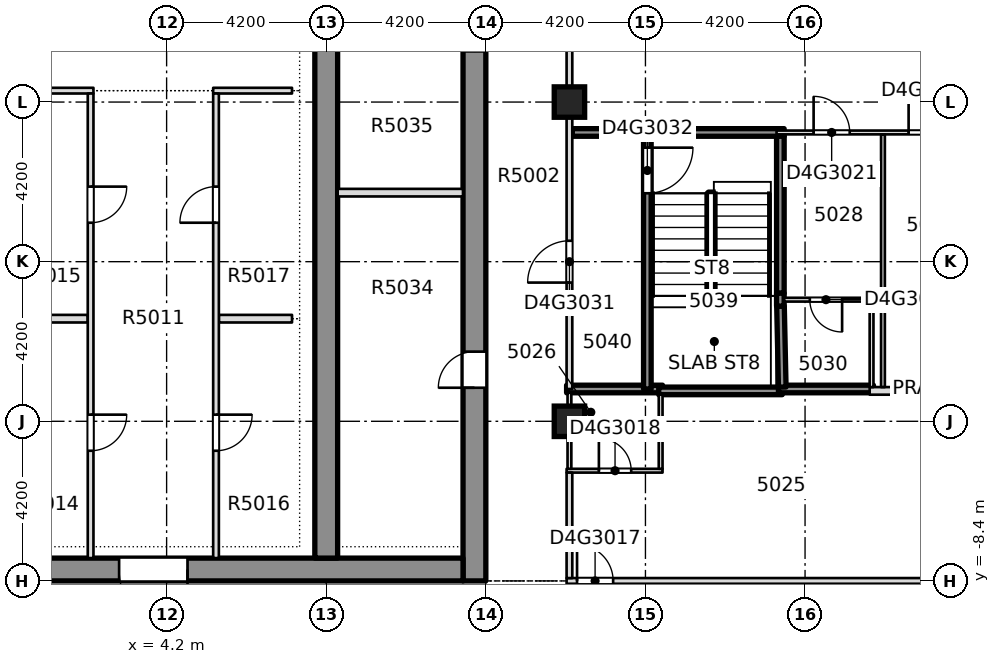
"""IFC4 building model, lengths in metres.
Left out: names, types, materials, properties, quantities, classifications, styles, units other than length and angle.
Written with IfcOpenShell. Run it as: python <this file> out.ifc"""

import sys

from ifc_helpers import new_model, si_unit, direction, frame, frame_2d, origin, origin_2d, place, context, subcontext, project, spatial, rectangle, extrude, element, fill, save


model = new_model("IFC4")
c1 = context("Model", 3, precision=1e-05, world=origin(), true_north=direction((0.0, 1.0)))
c2 = subcontext(c1, "Body", "Model", "MODEL_VIEW")
j1 = project(units=[si_unit("LENGTHUNIT", "METRE"), si_unit("PLANEANGLEUNIT", "RADIAN")], contexts=[c1])
p1 = place(None, origin())
s1 = spatial("IfcSite", under=j1, at=p1, CompositionType="ELEMENT")
p2 = place(p1, origin())
s2 = spatial("IfcBuilding", under=s1, at=p2, CompositionType="ELEMENT")
p3 = place(p2, frame((0.0, 0.0, 192.8)))
s3 = spatial("IfcBuildingStorey", under=s2, at=p3, CompositionType="ELEMENT", Elevation=192.8)
p4 = place(p3, frame((12.3, -8.4, -0.4), z_axis=(0.0, 0.0, 1.0), x_axis=(0.0, 1.0, 0.0)))
e1 = element("IfcWall", 1, at=p4, inside=s3, PredefinedType="SHEAR", context=c2, shape_type="SweptSolid", body=[
    extrude(rectangle(XDim=30.15, YDim=0.6, at=frame_2d((15.075, 0.0))), origin(), (0.0, 0.0, 1.0), 3.45),
])
p5 = place(p4, frame((5.083, 0.0, 0.4)))
e2 = element("IfcOpeningElement", 2, at=p5, cuts=e1, PredefinedType="OPENING", context=c2, shape_type="SweptSolid", body=[
    extrude(rectangle(XDim=0.95, YDim=2.1, at=frame_2d((0.475, 1.05))), frame((0.0, 0.31, 0.0), z_axis=(0.0, -1.0, 0.0), x_axis=(1.0, 0.0, 0.0)), (0.0, 0.0, 1.0), 0.62),
])
p6 = place(p4, frame((13.933, 0.0, 0.4)))
e3 = element("IfcOpeningElement", 3, at=p6, cuts=e1, PredefinedType="OPENING", context=c2, shape_type="SweptSolid", body=[
    extrude(rectangle(XDim=0.95, YDim=2.1, at=frame_2d((0.475, 1.05))), frame((0.0, 0.31, 0.0), z_axis=(0.0, -1.0, 0.0), x_axis=(1.0, 0.0, 0.0)), (0.0, 0.0, 1.0), 0.62),
])
p7 = place(p4, frame((22.719, 0.0, 0.4)))
e4 = element("IfcOpeningElement", 4, at=p7, cuts=e1, PredefinedType="OPENING", context=c2, shape_type="SweptSolid", body=[
    extrude(rectangle(XDim=0.95, YDim=2.1, at=frame_2d((0.475, 1.05))), frame((0.0, 0.31, 0.0), z_axis=(0.0, -1.0, 0.0), x_axis=(1.0, 0.0, 0.0)), (0.0, 0.0, 1.0), 0.62),
])
p8 = place(p4, frame((25.506, 0.0, 0.4)))
e5 = element("IfcOpeningElement", 5, at=p8, cuts=e1, PredefinedType="OPENING", context=c2, shape_type="SweptSolid", body=[
    extrude(rectangle(XDim=0.95, YDim=2.1, at=frame_2d((0.475, 1.05))), frame((0.0, 0.31, 0.0), z_axis=(0.0, -1.0, 0.0), x_axis=(1.0, 0.0, 0.0)), (0.0, 0.0, 1.0), 0.62),
])
p9 = place(p4, frame((27.537, 0.0, 0.4)))
e6 = element("IfcOpeningElement", 6, at=p9, cuts=e1, PredefinedType="OPENING", context=c2, shape_type="SweptSolid", body=[
    extrude(rectangle(XDim=0.95, YDim=2.1, at=frame_2d((0.475, 1.05))), frame((0.0, 0.31, 0.0), z_axis=(0.0, -1.0, 0.0), x_axis=(1.0, 0.0, 0.0)), (0.0, 0.0, 1.0), 0.62),
])
p10 = place(p4, frame((19.3, 0.0, 0.4)))
e7 = element("IfcOpeningElement", 7, at=p10, cuts=e1, PredefinedType="OPENING", context=c2, shape_type="SweptSolid", body=[
    extrude(rectangle(XDim=1.2, YDim=2.1, at=frame_2d((0.6, 1.05))), frame((0.0, 0.31, 0.0), z_axis=(0.0, -1.0, 0.0), x_axis=(1.0, 0.0, 0.0)), (0.0, 0.0, 1.0), 0.62),
])
p11 = place(p3, frame((-12.0, -8.1, -0.4), z_axis=(0.0, 0.0, 1.0), x_axis=(1.0, 0.0, 0.0)))
e8 = element("IfcWall", 8, at=p11, inside=s3, PredefinedType="SHEAR", context=c2, shape_type="SweptSolid", body=[
    extrude(rectangle(XDim=24.0, YDim=0.6, at=frame_2d((12.0, 0.0))), origin(), (0.0, 0.0, 1.0), 3.45),
])
p12 = place(p11, frame((7.25, 0.0, 0.4)))
e9 = element("IfcOpeningElement", 9, at=p12, cuts=e8, PredefinedType="OPENING", context=c2, shape_type="SweptSolid", body=[
    extrude(rectangle(XDim=1.8, YDim=2.1, at=frame_2d((0.9, 1.05))), frame((0.0, 0.31, 0.0), z_axis=(0.0, -1.0, 0.0), x_axis=(1.0, 0.0, 0.0)), (0.0, 0.0, 1.0), 0.62),
])
p13 = place(p11, frame((14.95, 0.0, 0.4)))
e10 = element("IfcOpeningElement", 10, at=p13, cuts=e8, PredefinedType="OPENING", context=c2, shape_type="SweptSolid", body=[
    extrude(rectangle(XDim=1.8, YDim=2.1, at=frame_2d((0.9, 1.05))), frame((0.0, 0.31, 0.0), z_axis=(0.0, -1.0, 0.0), x_axis=(1.0, 0.0, 0.0)), (0.0, 0.0, 1.0), 0.62),
])
p14 = place(p3, frame((8.4, -7.8, -0.4), z_axis=(0.0, 0.0, 1.0), x_axis=(0.0, 1.0, 0.0)))
e11 = element("IfcWall", 11, at=p14, inside=s3, PredefinedType="SHEAR", context=c2, shape_type="SweptSolid", body=[
    extrude(rectangle(XDim=28.95, YDim=0.6, at=frame_2d((14.475, 0.0))), origin(), (0.0, 0.0, 1.0), 3.45),
])
p15 = place(p14, frame((18.7, 0.0, 0.4)))
e12 = element("IfcOpeningElement", 12, at=p15, cuts=e11, PredefinedType="OPENING", context=c2, shape_type="SweptSolid", body=[
    extrude(rectangle(XDim=1.2, YDim=2.1, at=frame_2d((0.6, 1.05))), frame((0.0, 0.31, 0.0), z_axis=(0.0, -1.0, 0.0), x_axis=(1.0, 0.0, 0.0)), (0.0, 0.0, 1.0), 0.62),
])
for number, where, z_axis, x_axis in (
    (13, (14.8, -4.2, -0.4), (0.0, 0.0, 1.0), (1.0, 0.0, 0.0)),
    (14, (14.8, 4.2, -0.4), (0.0, 0.0, 1.0), (1.0, 0.0, 0.0)),
):
    element("IfcColumn", number, at=place(p3, frame(where, z_axis=z_axis, x_axis=x_axis)), inside=s3, PredefinedType="COLUMN", context=c2, shape_type="SweptSolid", body=[
        extrude(rectangle(XDim=0.8, YDim=0.8, at=origin_2d()), origin(), (0.0, 0.0, 1.0), 3.45),
    ])
p16 = place(p3, frame((14.725, -8.4, 0.0), z_axis=(0.0, 0.0, 1.0), x_axis=(1.0, 0.0, 0.0)))
e15 = element("IfcWall", 15, at=p16, inside=s3, PredefinedType="PARTITIONING", context=c2, shape_type="SweptSolid", body=[
    extrude(rectangle(XDim=11.025, YDim=0.15, at=frame_2d((5.512, 0.0))), origin(), (0.0, 0.0, 1.0), 3.05),
])
p17 = place(p16, frame((0.275, 0.0, 0.0)))
e16 = element("IfcOpeningElement", 16, at=p17, cuts=e15, PredefinedType="OPENING", context=c2, shape_type="SweptSolid", body=[
    extrude(rectangle(XDim=0.95, YDim=2.1, at=frame_2d((0.475, 1.05))), frame((0.0, 0.085, 0.0), z_axis=(0.0, -1.0, 0.0), x_axis=(1.0, 0.0, 0.0)), (0.0, 0.0, 1.0), 0.17),
])
p18 = place(p3, frame((14.725, -5.5, 0.0), z_axis=(0.0, 0.0, 1.0), x_axis=(1.0, 0.0, 0.0)))
e17 = element("IfcWall", 17, at=p18, inside=s3, PredefinedType="PARTITIONING", context=c2, shape_type="SweptSolid", body=[
    extrude(rectangle(XDim=2.525, YDim=0.1, at=frame_2d((1.262, 0.0))), origin(), (0.0, 0.0, 1.0), 3.05),
])
p19 = place(p18, frame((0.85, 0.0, 0.0)))
e18 = element("IfcOpeningElement", 18, at=p19, cuts=e17, PredefinedType="OPENING", context=c2, shape_type="SweptSolid", body=[
    extrude(rectangle(XDim=0.85, YDim=2.1, at=frame_2d((0.425, 1.05))), frame((0.0, 0.06, 0.0), z_axis=(0.0, -1.0, 0.0), x_axis=(1.0, 0.0, 0.0)), (0.0, 0.0, 1.0), 0.12),
])
p20 = place(p3, frame((14.725, -3.35, 0.0), z_axis=(0.0, 0.0, 1.0), x_axis=(1.0, 0.0, 0.0)))
e19 = element("IfcWall", 19, at=p20, inside=s3, PredefinedType="SOLIDWALL", context=c2, shape_type="SweptSolid", body=[
    extrude(rectangle(XDim=2.525, YDim=0.2, at=frame_2d((1.262, 0.0))), origin(), (0.0, 0.0, 1.0), 3.05),
])
p21 = place(p3, frame((17.15, -3.4, 0.0), z_axis=(0.0, 0.0, 1.0), x_axis=(1.0, 0.0, 0.0)))
e20 = element("IfcWall", 20, at=p21, inside=s3, PredefinedType="SOLIDWALL", context=c2, shape_type="SweptSolid", body=[
    extrude(rectangle(XDim=3.25, YDim=0.2, at=frame_2d((1.625, 0.0))), origin(), (0.0, 0.0, 1.0), 3.05),
])
p22 = place(p3, frame((20.3, -3.35, 0.0), z_axis=(0.0, 0.0, 1.0), x_axis=(1.0, 0.0, 0.0)))
e21 = element("IfcWall", 21, at=p22, inside=s3, PredefinedType="SOLIDWALL", context=c2, shape_type="SweptSolid", body=[
    extrude(rectangle(XDim=2.5, YDim=0.2, at=frame_2d((1.25, 0.0))), origin(), (0.0, 0.0, 1.0), 3.05),
])
p23 = place(p3, frame((22.7, -3.4, 0.0), z_axis=(0.0, 0.0, 1.0), x_axis=(1.0, 0.0, 0.0)))
e22 = element("IfcWall", 22, at=p23, inside=s3, PredefinedType="PARTITIONING", context=c2, shape_type="SweptSolid", body=[
    extrude(rectangle(XDim=3.05, YDim=0.2, at=frame_2d((1.525, 0.0))), origin(), (0.0, 0.0, 1.0), 3.05),
])
p24 = place(p3, frame((20.45, -1.0, 0.0), z_axis=(0.0, 0.0, 1.0), x_axis=(1.0, 0.0, 0.0)))
e23 = element("IfcWall", 23, at=p24, inside=s3, PredefinedType="PARTITIONING", context=c2, shape_type="SweptSolid", body=[
    extrude(rectangle(XDim=2.35, YDim=0.1, at=frame_2d((1.175, 0.0))), origin(), (0.0, 0.0, 1.0), 3.05),
])
p25 = place(p24, frame((0.675, 0.0, 0.0)))
e24 = element("IfcOpeningElement", 24, at=p25, cuts=e23, PredefinedType="OPENING", context=c2, shape_type="SweptSolid", body=[
    extrude(rectangle(XDim=0.85, YDim=2.1, at=frame_2d((0.425, 1.05))), frame((0.0, 0.06, 0.0), z_axis=(0.0, -1.0, 0.0), x_axis=(1.0, 0.0, 0.0)), (0.0, 0.0, 1.0), 0.12),
])
p26 = place(p3, frame((14.875, 3.4, 0.0), z_axis=(0.0, 0.0, 1.0), x_axis=(1.0, 0.0, 0.0)))
e25 = element("IfcWall", 25, at=p26, inside=s3, PredefinedType="SOLIDWALL", context=c2, shape_type="SweptSolid", body=[
    extrude(rectangle(XDim=5.575, YDim=0.2, at=frame_2d((2.788, 0.0))), origin(), (0.0, 0.0, 1.0), 3.05),
])
p27 = place(p3, frame((20.25, 3.4, 0.0), z_axis=(0.0, 0.0, 1.0), x_axis=(1.0, 0.0, 0.0)))
e26 = element("IfcWall", 26, at=p27, inside=s3, PredefinedType="PARTITIONING", context=c2, shape_type="SweptSolid", body=[
    extrude(rectangle(XDim=5.5, YDim=0.1, at=frame_2d((2.75, 0.0))), origin(), (0.0, 0.0, 1.0), 3.05),
])
p28 = place(p27, frame((3.475, 0.0, 0.0)))
e27 = element("IfcOpeningElement", 27, at=p28, cuts=e26, PredefinedType="OPENING", context=c2, shape_type="SweptSolid", body=[
    extrude(rectangle(XDim=0.95, YDim=2.1, at=frame_2d((0.475, 1.05))), frame((0.0, 0.06, 0.0), z_axis=(0.0, -1.0, 0.0), x_axis=(1.0, 0.0, 0.0)), (0.0, 0.0, 1.0), 0.12),
])
p29 = place(p27, frame((0.975, 0.0, 0.0)))
e28 = element("IfcOpeningElement", 28, at=p29, cuts=e26, PredefinedType="OPENING", context=c2, shape_type="SweptSolid", body=[
    extrude(rectangle(XDim=0.95, YDim=2.1, at=frame_2d((0.475, 1.05))), frame((0.0, 0.06, 0.0), z_axis=(0.0, -1.0, 0.0), x_axis=(1.0, 0.0, 0.0)), (0.0, 0.0, 1.0), 0.12),
])
p30 = place(p3, frame((14.8, -8.325, 0.0), z_axis=(0.0, 0.0, 1.0), x_axis=(0.0, 1.0, 0.0)))
e29 = element("IfcWall", 29, at=p30, inside=s3, PredefinedType="PARTITIONING", context=c2, shape_type="SweptSolid", body=[
    extrude(rectangle(XDim=2.775, YDim=0.15, at=frame_2d((1.387, 0.0))), origin(), (0.0, 0.0, 1.0), 3.05),
])
p31 = place(p3, frame((14.8, -5.45, 0.0), z_axis=(0.0, 0.0, 1.0), x_axis=(0.0, 1.0, 0.0)))
e30 = element("IfcWall", 30, at=p31, inside=s3, PredefinedType="PARTITIONING", context=c2, shape_type="SweptSolid", body=[
    extrude(rectangle(XDim=2.0, YDim=0.1, at=frame_2d((1.0, 0.0))), origin(), (0.0, 0.0, 1.0), 3.05),
])
p32 = place(p3, frame((14.8, -3.35, 0.0), z_axis=(0.0, 0.0, 1.0), x_axis=(0.0, 1.0, 0.0)))
e31 = element("IfcWall", 31, at=p32, inside=s3, PredefinedType="PARTITIONING", context=c2, shape_type="SweptSolid", body=[
    extrude(rectangle(XDim=11.675, YDim=0.15, at=frame_2d((5.837, 0.0))), origin(), (0.0, 0.0, 1.0), 3.05),
])
p33 = place(p32, frame((2.8, 0.0, 0.0)))
e32 = element("IfcOpeningElement", 32, at=p33, cuts=e31, PredefinedType="OPENING", context=c2, shape_type="SweptSolid", body=[
    extrude(rectangle(XDim=1.1, YDim=2.1, at=frame_2d((0.55, 1.05))), frame((0.0, 0.085, 0.0), z_axis=(0.0, -1.0, 0.0), x_axis=(1.0, 0.0, 0.0)), (0.0, 0.0, 1.0), 0.17),
])
p34 = place(p3, frame((16.85, -3.35, 0.0), z_axis=(0.0, 0.0, 1.0), x_axis=(0.0, 1.0, 0.0)))
e33 = element("IfcWall", 33, at=p34, inside=s3, PredefinedType="SOLIDWALL", context=c2, shape_type="SweptSolid", body=[
    extrude(rectangle(XDim=6.65, YDim=0.2, at=frame_2d((3.325, 0.0))), origin(), (0.0, 0.0, 1.0), 3.05),
])
p35 = place(p34, frame((5.15, 0.0, 0.0)))
e34 = element("IfcOpeningElement", 34, at=p35, cuts=e33, PredefinedType="OPENING", context=c2, shape_type="SweptSolid", body=[
    extrude(rectangle(XDim=1.2, YDim=2.1, at=frame_2d((0.6, 1.05))), frame((0.0, 0.11, 0.0), z_axis=(0.0, -1.0, 0.0), x_axis=(1.0, 0.0, 0.0)), (0.0, 0.0, 1.0), 0.22),
])
p36 = place(p3, frame((17.2, -5.45, 0.0), z_axis=(0.0, 0.0, 1.0), x_axis=(0.0, 1.0, 0.0)))
e35 = element("IfcWall", 35, at=p36, inside=s3, PredefinedType="PARTITIONING", context=c2, shape_type="SweptSolid", body=[
    extrude(rectangle(XDim=1.95, YDim=0.1, at=frame_2d((0.975, 0.0))), origin(), (0.0, 0.0, 1.0), 3.05),
])
p37 = place(p3, frame((20.4, -3.3, 0.0), z_axis=(0.0, 0.0, 1.0), x_axis=(-0.021771342749, 0.999762976227, 0.0)))
e36 = element("IfcWall", 36, at=p37, inside=s3, PredefinedType="SOLIDWALL", context=c2, shape_type="SweptSolid", body=[
    extrude(rectangle(XDim=2.131, YDim=0.2, at=frame_2d((1.065, 0.0))), origin(), (0.0, 0.0, 1.0), 3.05),
])
p38 = place(p3, frame((20.35, -0.83, 0.0), z_axis=(0.0, 0.0, 1.0), x_axis=(0.0, 1.0, 0.0)))
e37 = element("IfcWall", 37, at=p38, inside=s3, PredefinedType="SOLIDWALL", context=c2, shape_type="SweptSolid", body=[
    extrude(rectangle(XDim=4.13, YDim=0.2, at=frame_2d((2.065, 0.0))), origin(), (0.0, 0.0, 1.0), 3.05),
])
p39 = place(p3, frame((22.75, -3.3, 0.0), z_axis=(0.0, 0.0, 1.0), x_axis=(0.0, 1.0, 0.0)))
e38 = element("IfcWall", 38, at=p39, inside=s3, PredefinedType="PARTITIONING", context=c2, shape_type="SweptSolid", body=[
    extrude(rectangle(XDim=2.25, YDim=0.1, at=frame_2d((1.125, 0.0))), origin(), (0.0, 0.0, 1.0), 3.05),
])
p40 = place(p3, frame((23.05, -3.3, 0.0), z_axis=(0.0, 0.0, 1.0), x_axis=(0.0, 1.0, 0.0)))
e39 = element("IfcWall", 39, at=p40, inside=s3, PredefinedType="PARTITIONING", context=c2, shape_type="SweptSolid", body=[
    extrude(rectangle(XDim=6.65, YDim=0.1, at=frame_2d((3.325, 0.0))), origin(), (0.0, 0.0, 1.0), 3.05),
])
p41 = place(p3, frame((0.1, -1.5, 0.0), z_axis=(0.0, 0.0, 1.0), x_axis=(1.0, 0.0, 0.0)))
e40 = element("IfcWall", 40, at=p41, inside=s3, PredefinedType="PARTITIONING", context=c2, shape_type="SweptSolid", body=[
    extrude(rectangle(XDim=2.025, YDim=0.2, at=frame_2d((1.012, 0.0))), origin(), (0.0, 0.0, 1.0), 3.05),
])
p42 = place(p3, frame((5.575, -1.5, 0.0), z_axis=(0.0, 0.0, 1.0), x_axis=(1.0, 0.0, 0.0)))
e41 = element("IfcWall", 41, at=p42, inside=s3, PredefinedType="PARTITIONING", context=c2, shape_type="SweptSolid", body=[
    extrude(rectangle(XDim=1.925, YDim=0.2, at=frame_2d((0.962, 0.0))), origin(), (0.0, 0.0, 1.0), 3.05),
])
p43 = place(p3, frame((-2.275, 4.5, 0.0), z_axis=(0.0, 0.0, 1.0), x_axis=(1.0, 0.0, 0.0)))
e42 = element("IfcWall", 42, at=p43, inside=s3, PredefinedType="PARTITIONING", context=c2, shape_type="SweptSolid", body=[
    extrude(rectangle(XDim=4.55, YDim=0.15, at=frame_2d((2.275, 0.0))), origin(), (0.0, 0.0, 1.0), 3.05),
])
p44 = place(p3, frame((5.425, 4.5, 0.0), z_axis=(0.0, 0.0, 1.0), x_axis=(1.0, 0.0, 0.0)))
e43 = element("IfcWall", 43, at=p44, inside=s3, PredefinedType="PARTITIONING", context=c2, shape_type="SweptSolid", body=[
    extrude(rectangle(XDim=2.075, YDim=0.15, at=frame_2d((1.038, 0.0))), origin(), (0.0, 0.0, 1.0), 3.05),
])
p45 = place(p3, frame((2.2, -7.799, 0.0), z_axis=(0.0, 0.0, 1.0), x_axis=(0.0, 1.0, 0.0)))
e44 = element("IfcWall", 44, at=p45, inside=s3, PredefinedType="PARTITIONING", context=c2, shape_type="SweptSolid", body=[
    extrude(rectangle(XDim=12.224, YDim=0.15, at=frame_2d((6.112, 0.0))), origin(), (0.0, 0.0, 1.0), 3.05),
])
p46 = place(p45, frame((2.824, 0.0, 0.0)))
e45 = element("IfcOpeningElement", 45, at=p46, cuts=e44, PredefinedType="OPENING", context=c2, shape_type="SweptSolid", body=[
    extrude(rectangle(XDim=0.95, YDim=2.1, at=frame_2d((0.475, 1.05))), frame((0.0, 0.085, 0.0), z_axis=(0.0, -1.0, 0.0), x_axis=(1.0, 0.0, 0.0)), (0.0, 0.0, 1.0), 0.17),
])
p47 = place(p45, frame((8.824, 0.0, 0.0)))
e46 = element("IfcOpeningElement", 46, at=p47, cuts=e44, PredefinedType="OPENING", context=c2, shape_type="SweptSolid", body=[
    extrude(rectangle(XDim=0.95, YDim=2.1, at=frame_2d((0.475, 1.05))), frame((0.0, 0.085, 0.0), z_axis=(0.0, -1.0, 0.0), x_axis=(1.0, 0.0, 0.0)), (0.0, 0.0, 1.0), 0.17),
])
p48 = place(p3, frame((5.5, -7.799, 0.0), z_axis=(0.0, 0.0, 1.0), x_axis=(0.0, 1.0, 0.0)))
e47 = element("IfcWall", 47, at=p48, inside=s3, PredefinedType="PARTITIONING", context=c2, shape_type="SweptSolid", body=[
    extrude(rectangle(XDim=12.224, YDim=0.15, at=frame_2d((6.112, 0.0))), origin(), (0.0, 0.0, 1.0), 3.05),
])
p49 = place(p48, frame((2.824, 0.0, 0.0)))
e48 = element("IfcOpeningElement", 48, at=p49, cuts=e47, PredefinedType="OPENING", context=c2, shape_type="SweptSolid", body=[
    extrude(rectangle(XDim=0.95, YDim=2.1, at=frame_2d((0.475, 1.05))), frame((0.0, 0.085, 0.0), z_axis=(0.0, -1.0, 0.0), x_axis=(1.0, 0.0, 0.0)), (0.0, 0.0, 1.0), 0.17),
])
p50 = place(p48, frame((8.824, 0.0, 0.0)))
e49 = element("IfcOpeningElement", 49, at=p50, cuts=e47, PredefinedType="OPENING", context=c2, shape_type="SweptSolid", body=[
    extrude(rectangle(XDim=0.95, YDim=2.1, at=frame_2d((0.475, 1.05))), frame((0.0, 0.085, 0.0), z_axis=(0.0, -1.0, 0.0), x_axis=(1.0, 0.0, 0.0)), (0.0, 0.0, 1.0), 0.17),
])
p51 = place(p3, frame((8.701, 1.816, 0.0), z_axis=(0.0, 0.0, 1.0), x_axis=(1.0, 0.0, 0.0)))
e50 = element("IfcWall", 50, at=p51, inside=s3, PredefinedType="PARTITIONING", context=c2, shape_type="SweptSolid", body=[
    extrude(rectangle(XDim=3.298, YDim=0.2, at=frame_2d((1.649, 0.0))), origin(), (0.0, 0.0, 1.0), 3.05),
])
p52 = place(p3, frame((20.35, -1.17, 0.0), z_axis=(0.0, 0.0, 1.0), x_axis=(0.0, 1.0, 0.0)))
e51 = element("IfcWall", 51, at=p52, inside=s3, PredefinedType="SOLIDWALL", context=c2, shape_type="SweptSolid", body=[
    extrude(rectangle(XDim=0.34, YDim=0.2, at=frame_2d((0.17, 0.0))), origin(), (0.0, 0.0, 1.0), 3.05),
])
p53 = place(p17, origin())
e52 = element("IfcDoor", 52, at=p53, inside=s3, OperationType="SINGLE_SWING_LEFT", PredefinedType="DOOR", context=c2, shape_type="SweptSolid", body=[
    extrude(rectangle(XDim=0.95, YDim=2.1, at=frame_2d((0.475, 1.05))), frame((0.0, 0.025, 0.0), z_axis=(0.0, -1.0, 0.0), x_axis=(1.0, 0.0, 0.0)), (0.0, 0.0, 1.0), 0.05),
])
fill(e16, e52)
p54 = place(p19, origin())
e53 = element("IfcDoor", 53, at=p54, inside=s3, OperationType="SINGLE_SWING_LEFT", PredefinedType="DOOR", context=c2, shape_type="SweptSolid", body=[
    extrude(rectangle(XDim=0.85, YDim=2.1, at=frame_2d((0.425, 1.05))), frame((0.0, 0.025, 0.0), z_axis=(0.0, -1.0, 0.0), x_axis=(1.0, 0.0, 0.0)), (0.0, 0.0, 1.0), 0.05),
])
fill(e18, e53)
p55 = place(p28, origin())
e54 = element("IfcDoor", 54, at=p55, inside=s3, OperationType="SINGLE_SWING_RIGHT", PredefinedType="DOOR", context=c2, shape_type="SweptSolid", body=[
    extrude(rectangle(XDim=0.95, YDim=2.1, at=frame_2d((0.475, 1.05))), frame((0.0, 0.025, 0.0), z_axis=(0.0, -1.0, 0.0), x_axis=(1.0, 0.0, 0.0)), (0.0, 0.0, 1.0), 0.05),
])
fill(e27, e54)
p56 = place(p29, origin())
e55 = element("IfcDoor", 55, at=p56, inside=s3, OperationType="SINGLE_SWING_RIGHT", PredefinedType="DOOR", context=c2, shape_type="SweptSolid", body=[
    extrude(rectangle(XDim=0.95, YDim=2.1, at=frame_2d((0.475, 1.05))), frame((0.0, 0.025, 0.0), z_axis=(0.0, -1.0, 0.0), x_axis=(1.0, 0.0, 0.0)), (0.0, 0.0, 1.0), 0.05),
])
fill(e28, e55)
p57 = place(p25, origin())
e56 = element("IfcDoor", 56, at=p57, inside=s3, OperationType="SINGLE_SWING_RIGHT", PredefinedType="DOOR", context=c2, shape_type="SweptSolid", body=[
    extrude(rectangle(XDim=0.85, YDim=2.1, at=frame_2d((0.425, 1.05))), frame((0.0, 0.025, 0.0), z_axis=(0.0, -1.0, 0.0), x_axis=(1.0, 0.0, 0.0)), (0.0, 0.0, 1.0), 0.05),
])
fill(e24, e56)
p58 = place(p33, origin())
e57 = element("IfcDoor", 57, at=p58, inside=s3, OperationType="SINGLE_SWING_LEFT", PredefinedType="DOOR", context=c2, shape_type="SweptSolid", body=[
    extrude(rectangle(XDim=1.1, YDim=2.1, at=frame_2d((0.55, 1.05))), frame((0.0, 0.025, 0.0), z_axis=(0.0, -1.0, 0.0), x_axis=(1.0, 0.0, 0.0)), (0.0, 0.0, 1.0), 0.05),
])
fill(e32, e57)
p59 = place(p35, origin())
e58 = element("IfcDoor", 58, at=p59, inside=s3, OperationType="SINGLE_SWING_LEFT", PredefinedType="DOOR", context=c2, shape_type="SweptSolid", body=[
    extrude(rectangle(XDim=1.2, YDim=2.1, at=frame_2d((0.6, 1.05))), frame((0.0, 0.025, 0.0), z_axis=(0.0, -1.0, 0.0), x_axis=(1.0, 0.0, 0.0)), (0.0, 0.0, 1.0), 0.05),
])
fill(e34, e58)
p60 = place(p46, origin())
e59 = element("IfcDoor", 59, at=p60, inside=s3, OperationType="SINGLE_SWING_RIGHT", PredefinedType="DOOR", context=c2, shape_type="SweptSolid", body=[
    extrude(rectangle(XDim=0.95, YDim=2.1, at=frame_2d((0.475, 1.05))), frame((0.0, 0.025, 0.0), z_axis=(0.0, -1.0, 0.0), x_axis=(1.0, 0.0, 0.0)), (0.0, 0.0, 1.0), 0.05),
])
fill(e45, e59)
p61 = place(p47, origin())
e60 = element("IfcDoor", 60, at=p61, inside=s3, OperationType="SINGLE_SWING_RIGHT", PredefinedType="DOOR", context=c2, shape_type="SweptSolid", body=[
    extrude(rectangle(XDim=0.95, YDim=2.1, at=frame_2d((0.475, 1.05))), frame((0.0, 0.025, 0.0), z_axis=(0.0, -1.0, 0.0), x_axis=(1.0, 0.0, 0.0)), (0.0, 0.0, 1.0), 0.05),
])
fill(e46, e60)
p62 = place(p49, origin())
e61 = element("IfcDoor", 61, at=p62, inside=s3, OperationType="SINGLE_SWING_LEFT", PredefinedType="DOOR", context=c2, shape_type="SweptSolid", body=[
    extrude(rectangle(XDim=0.95, YDim=2.1, at=frame_2d((0.475, 1.05))), frame((0.0, 0.025, 0.0), z_axis=(0.0, -1.0, 0.0), x_axis=(1.0, 0.0, 0.0)), (0.0, 0.0, 1.0), 0.05),
])
fill(e48, e61)
p63 = place(p50, origin())
e62 = element("IfcDoor", 62, at=p63, inside=s3, OperationType="SINGLE_SWING_LEFT", PredefinedType="DOOR", context=c2, shape_type="SweptSolid", body=[
    extrude(rectangle(XDim=0.95, YDim=2.1, at=frame_2d((0.475, 1.05))), frame((0.0, 0.025, 0.0), z_axis=(0.0, -1.0, 0.0), x_axis=(1.0, 0.0, 0.0)), (0.0, 0.0, 1.0), 0.05),
])
fill(e49, e62)
p64 = place(p13, origin())
e63 = element("IfcDoor", 63, at=p64, inside=s3, OperationType="SINGLE_SWING_LEFT", PredefinedType="DOOR", context=c2, shape_type="SweptSolid", body=[
    extrude(rectangle(XDim=1.8, YDim=2.1, at=frame_2d((0.9, 1.05))), frame((0.0, 0.025, 0.0), z_axis=(0.0, -1.0, 0.0), x_axis=(1.0, 0.0, 0.0)), (0.0, 0.0, 1.0), 0.05),
])
fill(e10, e63)
p65 = place(p5, origin())
e64 = element("IfcDoor", 64, at=p65, inside=s3, OperationType="SINGLE_SWING_LEFT", PredefinedType="DOOR", context=c2, shape_type="SweptSolid", body=[
    extrude(rectangle(XDim=0.95, YDim=2.1, at=frame_2d((0.475, 1.05))), frame((0.0, 0.025, 0.0), z_axis=(0.0, -1.0, 0.0), x_axis=(1.0, 0.0, 0.0)), (0.0, 0.0, 1.0), 0.05),
])
fill(e2, e64)
save(model, sys.argv[1])
